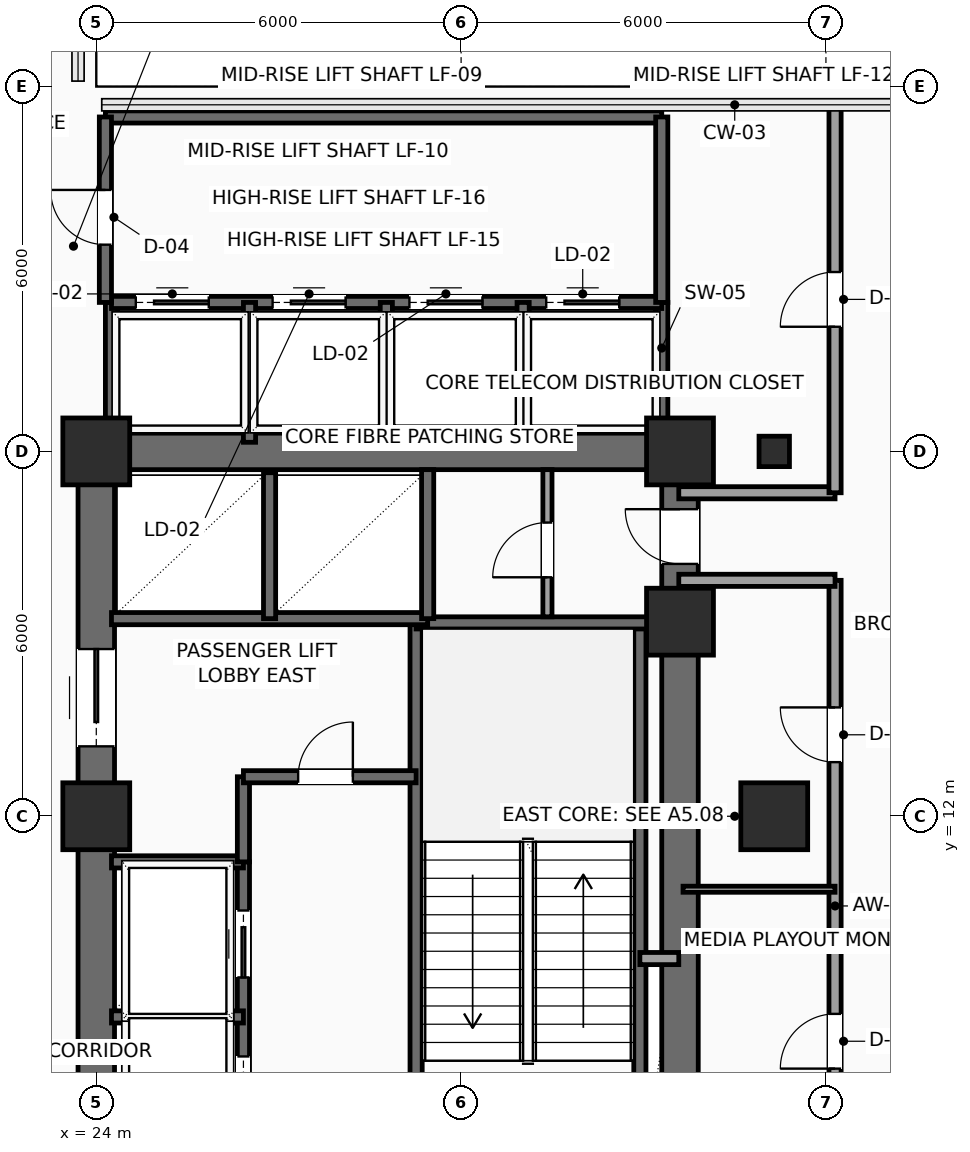
"""IFC4 building model, lengths in metres.
Left out: names, types, materials, properties, quantities, classifications, styles, units other than length and angle.
Written with IfcOpenShell. Run it as: python <this file> out.ifc"""

import sys

from ifc_helpers import new_model, si_unit, direction, frame, frame_2d, origin, origin_2d, place, context, subcontext, project, spatial, rectangle, hollow_rectangle, extrude, element, fill, save


model = new_model("IFC4")
c1 = context("Model", 3, precision=1e-05, world=origin(), true_north=direction((0.0, 1.0)))
c2 = subcontext(c1, "Body", "Model", "MODEL_VIEW")
j1 = project(units=[si_unit("LENGTHUNIT", "METRE"), si_unit("PLANEANGLEUNIT", "RADIAN")], contexts=[c1])
p1 = place(None, origin())
s1 = spatial("IfcSite", under=j1, at=p1, CompositionType="ELEMENT")
p2 = place(p1, origin())
s2 = spatial("IfcBuilding", under=s1, at=p2, CompositionType="ELEMENT")
p3 = place(p2, frame((0.0, 0.0, 138.15)))
s3 = spatial("IfcBuildingStorey", under=s2, at=p3, CompositionType="ELEMENT", Elevation=138.15)
for number, where, z_axis, x_axis in (
    (1, (24.0, 12.0, 0.0), (0.0, 0.0, 1.0), (1.0, 0.0, 0.0)),
    (2, (24.0, 18.0, 0.0), (0.0, 0.0, 1.0), (1.0, 0.0, 0.0)),
    (3, (33.6, 15.2, 0.0), (0.0, 0.0, 1.0), (1.0, 0.0, 0.0)),
    (4, (33.6, 18.0, 0.0), (0.0, 0.0, 1.0), (1.0, 0.0, 0.0)),
    (5, (35.15, 12.0, 0.0), (0.0, 0.0, 1.0), (1.0, 0.0, 0.0)),
):
    element("IfcColumn", number, at=place(p3, frame(where, z_axis=z_axis, x_axis=x_axis)), inside=s3, PredefinedType="COLUMN", context=c2, shape_type="SweptSolid", body=[
        extrude(rectangle(XDim=1.1, YDim=1.1, at=origin_2d()), origin(), (0.0, 0.0, 1.0), 3.75),
    ])
p4 = place(p3, frame((35.15, 18.0, 0.0), z_axis=(0.0, 0.0, 1.0), x_axis=(1.0, 0.0, 0.0)))
e6 = element("IfcColumn", 6, at=p4, inside=s3, PredefinedType="COLUMN", context=c2, shape_type="SweptSolid", body=[
    extrude(hollow_rectangle(XDim=0.5, YDim=0.5, WallThickness=0.025, InnerFilletRadius=0.025, OuterFilletRadius=0.04, at=origin_2d()), origin(), (0.0, 0.0, 1.0), 3.75),
])
p5 = place(p3, frame((24.0, 18.0, 0.0), z_axis=(0.0, 0.0, 1.0), x_axis=(1.0, 0.0, 0.0)))
e7 = element("IfcWall", 7, at=p5, inside=s3, PredefinedType="SHEAR", context=c2, shape_type="SweptSolid", body=[
    extrude(rectangle(XDim=9.6, YDim=0.6, at=frame_2d((4.8, 0.0))), origin(), (0.0, 0.0, 1.0), 3.525),
])
p6 = place(p3, frame((24.0, 6.0, 0.0), z_axis=(0.0, 0.0, 1.0), x_axis=(0.0, 1.0, 0.0)))
e8 = element("IfcWall", 8, at=p6, inside=s3, PredefinedType="SHEAR", context=c2, shape_type="SweptSolid", body=[
    extrude(rectangle(XDim=12.0, YDim=0.6, at=frame_2d((6.0, 0.0))), origin(), (0.0, 0.0, 1.0), 3.525),
])
p7 = place(p6, frame((7.15, 0.0, 0.0)))
e9 = element("IfcOpeningElement", 9, at=p7, cuts=e8, PredefinedType="OPENING", context=c2, shape_type="SweptSolid", body=[
    extrude(rectangle(XDim=1.6, YDim=2.3, at=frame_2d((0.8, 1.15))), frame((0.0, 0.31, 0.0), z_axis=(0.0, -1.0, 0.0), x_axis=(1.0, 0.0, 0.0)), (0.0, 0.0, 1.0), 0.62),
])
p8 = place(p3, frame((33.6, 6.0, 0.0), z_axis=(0.0, 0.0, 1.0), x_axis=(0.0, 1.0, 0.0)))
e10 = element("IfcWall", 10, at=p8, inside=s3, PredefinedType="SHEAR", context=c2, shape_type="SweptSolid", body=[
    extrude(rectangle(XDim=12.0, YDim=0.6, at=frame_2d((6.0, 0.0))), origin(), (0.0, 0.0, 1.0), 3.525),
])
p9 = place(p8, frame((10.15, 0.0, 0.0)))
e11 = element("IfcOpeningElement", 11, at=p9, cuts=e10, PredefinedType="OPENING", context=c2, shape_type="SweptSolid", body=[
    extrude(rectangle(XDim=0.9, YDim=2.15, at=frame_2d((0.45, 1.075))), frame((0.0, 0.31, 0.0), z_axis=(0.0, -1.0, 0.0), x_axis=(1.0, 0.0, 0.0)), (0.0, 0.0, 1.0), 0.62),
])
p10 = place(p3, frame((29.26, 6.3, 0.0), z_axis=(0.0, 0.0, 1.0), x_axis=(0.0, 1.0, 0.0)))
e12 = element("IfcWall", 12, at=p10, inside=s3, PredefinedType="SHEAR", context=c2, shape_type="SweptSolid", body=[
    extrude(rectangle(XDim=8.88, YDim=0.2, at=frame_2d((4.44, 0.0))), origin(), (0.0, 0.0, 1.0), 3.525),
])
p11 = place(p10, frame((0.35, 0.0, 0.0)))
e13 = element("IfcOpeningElement", 13, at=p11, cuts=e12, PredefinedType="OPENING", context=c2, shape_type="SweptSolid", body=[
    extrude(rectangle(XDim=1.1, YDim=2.2, at=frame_2d((0.55, 1.1))), frame((0.0, 0.11, 0.0), z_axis=(0.0, -1.0, 0.0), x_axis=(1.0, 0.0, 0.0)), (0.0, 0.0, 1.0), 0.22),
])
p12 = place(p3, frame((32.94, 6.3, 0.0), z_axis=(0.0, 0.0, 1.0), x_axis=(0.0, 1.0, 0.0)))
e14 = element("IfcWall", 14, at=p12, inside=s3, PredefinedType="SHEAR", context=c2, shape_type="SweptSolid", body=[
    extrude(rectangle(XDim=8.88, YDim=0.2, at=frame_2d((4.44, 0.0))), origin(), (0.0, 0.0, 1.0), 3.525),
])
p13 = place(p3, frame((29.26, 15.18, 0.0), z_axis=(0.0, 0.0, 1.0), x_axis=(1.0, 0.0, 0.0)))
e15 = element("IfcWall", 15, at=p13, inside=s3, PredefinedType="SHEAR", context=c2, shape_type="SweptSolid", body=[
    extrude(rectangle(XDim=4.04, YDim=0.2, at=frame_2d((2.02, 0.0))), origin(), (0.0, 0.0, 1.0), 3.525),
])
p14 = place(p3, frame((26.42, 6.3, 0.0), z_axis=(0.0, 0.0, 1.0), x_axis=(0.0, 1.0, 0.0)))
e16 = element("IfcWall", 16, at=p14, inside=s3, PredefinedType="SHEAR", context=c2, shape_type="SweptSolid", body=[
    extrude(rectangle(XDim=4.95, YDim=0.2, at=frame_2d((2.475, 0.0))), origin(), (0.0, 0.0, 1.0), 3.525),
])
p15 = place(p14, frame((0.65, 0.0, 0.0)))
e17 = element("IfcOpeningElement", 17, at=p15, cuts=e16, PredefinedType="OPENING", context=c2, shape_type="SweptSolid", body=[
    extrude(rectangle(XDim=1.1, YDim=2.2, at=frame_2d((0.55, 1.1))), frame((0.0, 0.11, 0.0), z_axis=(0.0, -1.0, 0.0), x_axis=(1.0, 0.0, 0.0)), (0.0, 0.0, 1.0), 0.22),
])
p16 = place(p14, frame((3.05, 0.0, 0.0)))
e18 = element("IfcOpeningElement", 18, at=p16, cuts=e16, PredefinedType="OPENING", context=c2, shape_type="SweptSolid", body=[
    extrude(rectangle(XDim=1.1, YDim=2.2, at=frame_2d((0.55, 1.1))), frame((0.0, 0.11, 0.0), z_axis=(0.0, -1.0, 0.0), x_axis=(1.0, 0.0, 0.0)), (0.0, 0.0, 1.0), 0.22),
])
for number, where, z_axis, x_axis in (
    (19, (24.25, 8.7, 0.0), (0.0, 0.0, 1.0), (1.0, 0.0, 0.0)),
    (20, (24.25, 11.25, 0.0), (0.0, 0.0, 1.0), (1.0, 0.0, 0.0)),
):
    element("IfcWall", number, at=place(p3, frame(where, z_axis=z_axis, x_axis=x_axis)), inside=s3, PredefinedType="SHEAR", context=c2, shape_type="SweptSolid", body=[
        extrude(rectangle(XDim=2.17, YDim=0.2, at=frame_2d((1.085, 0.0))), origin(), (0.0, 0.0, 1.0), 3.525),
    ])
p17 = place(p3, frame((26.42, 11.25, 0.0), z_axis=(0.0, 0.0, 1.0), x_axis=(0.0, 1.0, 0.0)))
e21 = element("IfcWall", 21, at=p17, inside=s3, PredefinedType="SHEAR", context=c2, shape_type="SweptSolid", body=[
    extrude(rectangle(XDim=1.4, YDim=0.2, at=frame_2d((0.7, 0.0))), origin(), (0.0, 0.0, 1.0), 3.525),
])
p18 = place(p3, frame((26.42, 12.65, 0.0), z_axis=(0.0, 0.0, 1.0), x_axis=(1.0, 0.0, 0.0)))
e22 = element("IfcWall", 22, at=p18, inside=s3, PredefinedType="SHEAR", context=c2, shape_type="SweptSolid", body=[
    extrude(rectangle(XDim=2.84, YDim=0.2, at=frame_2d((1.42, 0.0))), origin(), (0.0, 0.0, 1.0), 3.525),
])
p19 = place(p18, frame((0.9, 0.0, 0.0)))
e23 = element("IfcOpeningElement", 23, at=p19, cuts=e22, PredefinedType="OPENING", context=c2, shape_type="SweptSolid", body=[
    extrude(rectangle(XDim=0.9, YDim=2.15, at=frame_2d((0.45, 1.075))), frame((0.0, 0.11, 0.0), z_axis=(0.0, -1.0, 0.0), x_axis=(1.0, 0.0, 0.0)), (0.0, 0.0, 1.0), 0.22),
])
p20 = place(p3, frame((32.94, 9.66, 0.0), z_axis=(0.0, 0.0, 1.0), x_axis=(1.0, 0.0, 0.0)))
e24 = element("IfcWall", 24, at=p20, inside=s3, PredefinedType="SOLIDWALL", context=c2, shape_type="SweptSolid", body=[
    extrude(rectangle(XDim=0.64, YDim=0.2, at=frame_2d((0.32, 0.0))), origin(), (0.0, 0.0, 1.0), 3.525),
])
p21 = place(p3, frame((24.25, 15.25, 0.0), z_axis=(0.0, 0.0, 1.0), x_axis=(1.0, 0.0, 0.0)))
e25 = element("IfcWall", 25, at=p21, inside=s3, PredefinedType="SHEAR", context=c2, shape_type="SweptSolid", body=[
    extrude(rectangle(XDim=5.2, YDim=0.2, at=frame_2d((2.6, 0.0))), origin(), (0.0, 0.0, 1.0), 3.525),
])
p22 = place(p3, frame((26.85, 15.25, 0.0), z_axis=(0.0, 0.0, 1.0), x_axis=(0.0, 1.0, 0.0)))
e26 = element("IfcWall", 26, at=p22, inside=s3, PredefinedType="SHEAR", context=c2, shape_type="SweptSolid", body=[
    extrude(rectangle(XDim=2.4, YDim=0.2, at=frame_2d((1.2, 0.0))), origin(), (0.0, 0.0, 1.0), 3.525),
])
p23 = place(p3, frame((29.45, 15.25, 0.0), z_axis=(0.0, 0.0, 1.0), x_axis=(0.0, 1.0, 0.0)))
e27 = element("IfcWall", 27, at=p23, inside=s3, PredefinedType="SHEAR", context=c2, shape_type="SweptSolid", body=[
    extrude(rectangle(XDim=2.45, YDim=0.2, at=frame_2d((1.225, 0.0))), origin(), (0.0, 0.0, 1.0), 3.525),
])
p24 = place(p3, frame((31.42, 15.28, 0.0), z_axis=(0.0, 0.0, 1.0), x_axis=(0.0, 1.0, 0.0)))
e28 = element("IfcWall", 28, at=p24, inside=s3, PredefinedType="PARTITIONING", context=c2, shape_type="SweptSolid", body=[
    extrude(rectangle(XDim=2.42, YDim=0.15, at=frame_2d((1.21, 0.0))), origin(), (0.0, 0.0, 1.0), 3.525),
])
p25 = place(p24, frame((0.65, 0.0, 0.0)))
e29 = element("IfcOpeningElement", 29, at=p25, cuts=e28, PredefinedType="OPENING", context=c2, shape_type="SweptSolid", body=[
    extrude(rectangle(XDim=0.9, YDim=2.15, at=frame_2d((0.45, 1.075))), frame((0.0, 0.085, 0.0), z_axis=(0.0, -1.0, 0.0), x_axis=(1.0, 0.0, 0.0)), (0.0, 0.0, 1.0), 0.17),
])
for number, where, z_axis, x_axis in (
    (30, (33.3, 18.1, 0.0), (0.0, 0.0, 1.0), (0.0, 1.0, 0.0)),
    (31, (24.25, 18.1, 0.0), (0.0, 0.0, 1.0), (0.0, 1.0, 0.0)),
):
    element("IfcWall", number, at=place(p3, frame(where, z_axis=z_axis, x_axis=x_axis)), inside=s3, PredefinedType="SHEAR", context=c2, shape_type="SweptSolid", body=[
        extrude(rectangle(XDim=2.35, YDim=0.2, at=frame_2d((1.175, 0.0))), origin(), (0.0, 0.0, 1.0), 3.525),
    ])
p26 = place(p3, frame((24.25, 20.45, 0.0), z_axis=(0.0, 0.0, 1.0), x_axis=(1.0, 0.0, 0.0)))
e32 = element("IfcWall", 32, at=p26, inside=s3, PredefinedType="SHEAR", context=c2, shape_type="SweptSolid", body=[
    extrude(rectangle(XDim=9.05, YDim=0.2, at=frame_2d((4.525, 0.0))), origin(), (0.0, 0.0, 1.0), 3.525),
])
p27 = place(p26, frame((0.4, 0.0, 0.0)))
e33 = element("IfcOpeningElement", 33, at=p27, cuts=e32, PredefinedType="OPENING", context=c2, shape_type="SweptSolid", body=[
    extrude(rectangle(XDim=1.2, YDim=2.2, at=frame_2d((0.6, 1.1))), frame((0.0, 0.11, 0.0), z_axis=(0.0, -1.0, 0.0), x_axis=(1.0, 0.0, 0.0)), (0.0, 0.0, 1.0), 0.22),
])
p28 = place(p26, frame((2.65, 0.0, 0.0)))
e34 = element("IfcOpeningElement", 34, at=p28, cuts=e32, PredefinedType="OPENING", context=c2, shape_type="SweptSolid", body=[
    extrude(rectangle(XDim=1.2, YDim=2.2, at=frame_2d((0.6, 1.1))), frame((0.0, 0.11, 0.0), z_axis=(0.0, -1.0, 0.0), x_axis=(1.0, 0.0, 0.0)), (0.0, 0.0, 1.0), 0.22),
])
p29 = place(p26, frame((4.9, 0.0, 0.0)))
e35 = element("IfcOpeningElement", 35, at=p29, cuts=e32, PredefinedType="OPENING", context=c2, shape_type="SweptSolid", body=[
    extrude(rectangle(XDim=1.2, YDim=2.2, at=frame_2d((0.6, 1.1))), frame((0.0, 0.11, 0.0), z_axis=(0.0, -1.0, 0.0), x_axis=(1.0, 0.0, 0.0)), (0.0, 0.0, 1.0), 0.22),
])
p30 = place(p26, frame((7.15, 0.0, 0.0)))
e36 = element("IfcOpeningElement", 36, at=p30, cuts=e32, PredefinedType="OPENING", context=c2, shape_type="SweptSolid", body=[
    extrude(rectangle(XDim=1.2, YDim=2.2, at=frame_2d((0.6, 1.1))), frame((0.0, 0.11, 0.0), z_axis=(0.0, -1.0, 0.0), x_axis=(1.0, 0.0, 0.0)), (0.0, 0.0, 1.0), 0.22),
])
for number, where, z_axis, x_axis in (
    (37, (26.52, 18.15, 0.0), (0.0, 0.0, 1.0), (0.0, 1.0, 0.0)),
    (38, (28.77, 18.15, 0.0), (0.0, 0.0, 1.0), (0.0, 1.0, 0.0)),
    (39, (31.02, 18.15, 0.0), (0.0, 0.0, 1.0), (0.0, 1.0, 0.0)),
):
    element("IfcWall", number, at=place(p3, frame(where, z_axis=z_axis, x_axis=x_axis)), inside=s3, PredefinedType="SHEAR", context=c2, shape_type="SweptSolid", body=[
        extrude(rectangle(XDim=2.3, YDim=0.2, at=frame_2d((1.15, 0.0))), origin(), (0.0, 0.0, 1.0), 3.525),
    ])
p31 = place(p3, frame((24.15, 23.5, 0.0), z_axis=(0.0, 0.0, 1.0), x_axis=(1.0, 0.0, 0.0)))
e40 = element("IfcWall", 40, at=p31, inside=s3, PredefinedType="SHEAR", context=c2, shape_type="SweptSolid", body=[
    extrude(rectangle(XDim=9.15, YDim=0.2, at=frame_2d((4.575, 0.0))), origin(), (0.0, 0.0, 1.0), 3.525),
])
p32 = place(p3, frame((33.3, 20.45, 0.0), z_axis=(0.0, 0.0, 1.0), x_axis=(0.0, 1.0, 0.0)))
e41 = element("IfcWall", 41, at=p32, inside=s3, PredefinedType="SHEAR", context=c2, shape_type="SweptSolid", body=[
    extrude(rectangle(XDim=3.05, YDim=0.2, at=frame_2d((1.525, 0.0))), origin(), (0.0, 0.0, 1.0), 3.525),
])
p33 = place(p3, frame((24.15, 20.45, 0.0), z_axis=(0.0, 0.0, 1.0), x_axis=(0.0, 1.0, 0.0)))
e42 = element("IfcWall", 42, at=p33, inside=s3, PredefinedType="SHEAR", context=c2, shape_type="SweptSolid", body=[
    extrude(rectangle(XDim=3.05, YDim=0.2, at=frame_2d((1.525, 0.0))), origin(), (0.0, 0.0, 1.0), 3.525),
])
p34 = place(p33, frame((0.95, 0.0, 0.0)))
e43 = element("IfcOpeningElement", 43, at=p34, cuts=e42, PredefinedType="OPENING", context=c2, shape_type="SweptSolid", body=[
    extrude(rectangle(XDim=0.9, YDim=2.15, at=frame_2d((0.45, 1.075))), frame((0.0, 0.11, 0.0), z_axis=(0.0, -1.0, 0.0), x_axis=(1.0, 0.0, 0.0)), (0.0, 0.0, 1.0), 0.22),
])
p35 = place(p3, frame((36.15, 5.8, 0.0), z_axis=(0.0, 0.0, 1.0), x_axis=(0.0, 1.0, 0.0)))
e44 = element("IfcWall", 44, at=p35, inside=s3, PredefinedType="PARTITIONING", context=c2, shape_type="SweptSolid", body=[
    extrude(rectangle(XDim=10.08, YDim=0.2, at=frame_2d((5.04, 0.0))), origin(), (0.0, 0.0, 1.0), 3.525),
])
p36 = place(p35, frame((2.05, 0.0, 0.0)))
e45 = element("IfcOpeningElement", 45, at=p36, cuts=e44, PredefinedType="OPENING", context=c2, shape_type="SweptSolid", body=[
    extrude(rectangle(XDim=0.9, YDim=2.1, at=frame_2d((0.45, 1.05))), frame((0.0, 0.11, 0.0), z_axis=(0.0, -1.0, 0.0), x_axis=(1.0, 0.0, 0.0)), (0.0, 0.0, 1.0), 0.22),
])
p37 = place(p35, frame((7.09, 0.0, 0.0)))
e46 = element("IfcOpeningElement", 46, at=p37, cuts=e44, PredefinedType="OPENING", context=c2, shape_type="SweptSolid", body=[
    extrude(rectangle(XDim=0.9, YDim=2.1, at=frame_2d((0.45, 1.05))), frame((0.0, 0.11, 0.0), z_axis=(0.0, -1.0, 0.0), x_axis=(1.0, 0.0, 0.0)), (0.0, 0.0, 1.0), 0.22),
])
for number, where, z_axis, x_axis in (
    (47, (36.15, 15.88, 0.0), (0.0, 0.0, 1.0), (-1.0, 0.0, 0.0)),
    (48, (33.58, 17.32, 0.0), (0.0, 0.0, 1.0), (1.0, 0.0, 0.0)),
):
    element("IfcWall", number, at=place(p3, frame(where, z_axis=z_axis, x_axis=x_axis)), inside=s3, PredefinedType="PARTITIONING", context=c2, shape_type="SweptSolid", body=[
        extrude(rectangle(XDim=2.57, YDim=0.2, at=frame_2d((1.285, 0.0))), origin(), (0.0, 0.0, 1.0), 3.525),
    ])
p38 = place(p3, frame((36.15, 17.32, 0.0), z_axis=(0.0, 0.0, 1.0), x_axis=(0.0, 1.0, 0.0)))
e49 = element("IfcWall", 49, at=p38, inside=s3, PredefinedType="PARTITIONING", context=c2, shape_type="SweptSolid", body=[
    extrude(rectangle(XDim=6.38, YDim=0.2, at=frame_2d((3.19, 0.0))), origin(), (0.0, 0.0, 1.0), 3.525),
])
p39 = place(p38, frame((2.73, 0.0, 0.0)))
e50 = element("IfcOpeningElement", 50, at=p39, cuts=e49, PredefinedType="OPENING", context=c2, shape_type="SweptSolid", body=[
    extrude(rectangle(XDim=0.9, YDim=2.1, at=frame_2d((0.45, 1.05))), frame((0.0, 0.11, 0.0), z_axis=(0.0, -1.0, 0.0), x_axis=(1.0, 0.0, 0.0)), (0.0, 0.0, 1.0), 0.22),
])
p40 = place(p3, frame((33.65, 10.8, 0.0), z_axis=(0.0, 0.0, 1.0), x_axis=(1.0, 0.0, 0.0)))
e51 = element("IfcWall", 51, at=p40, inside=s3, PredefinedType="PARTITIONING", context=c2, shape_type="SweptSolid", body=[
    extrude(rectangle(XDim=2.5, YDim=0.1, at=frame_2d((1.25, 0.0))), origin(), (0.0, 0.0, 1.0), 3.525),
])
p41 = place(p7, origin())
e52 = element("IfcDoor", 52, at=p41, inside=s3, OperationType="DOUBLE_DOOR_SLIDING", PredefinedType="DOOR", context=c2, shape_type="SweptSolid", body=[
    extrude(rectangle(XDim=1.6, YDim=2.3, at=frame_2d((0.8, 1.15))), frame((0.0, 0.025, 0.0), z_axis=(0.0, -1.0, 0.0), x_axis=(1.0, 0.0, 0.0)), (0.0, 0.0, 1.0), 0.05),
])
fill(e9, e52)
p42 = place(p9, origin())
e53 = element("IfcDoor", 53, at=p42, inside=s3, OperationType="SINGLE_SWING_RIGHT", PredefinedType="DOOR", context=c2, shape_type="SweptSolid", body=[
    extrude(rectangle(XDim=0.9, YDim=2.15, at=frame_2d((0.45, 1.075))), frame((0.0, 0.025, 0.0), z_axis=(0.0, -1.0, 0.0), x_axis=(1.0, 0.0, 0.0)), (0.0, 0.0, 1.0), 0.05),
])
fill(e11, e53)
p43 = place(p15, origin())
e54 = element("IfcDoor", 54, at=p43, inside=s3, OperationType="SLIDING_TO_LEFT", PredefinedType="DOOR", context=c2, shape_type="SweptSolid", body=[
    extrude(rectangle(XDim=1.1, YDim=2.2, at=frame_2d((0.55, 1.1))), frame((0.0, 0.025, 0.0), z_axis=(0.0, -1.0, 0.0), x_axis=(1.0, 0.0, 0.0)), (0.0, 0.0, 1.0), 0.05),
])
fill(e17, e54)
p44 = place(p16, origin())
e55 = element("IfcDoor", 55, at=p44, inside=s3, OperationType="SLIDING_TO_LEFT", PredefinedType="DOOR", context=c2, shape_type="SweptSolid", body=[
    extrude(rectangle(XDim=1.1, YDim=2.2, at=frame_2d((0.55, 1.1))), frame((0.0, 0.025, 0.0), z_axis=(0.0, -1.0, 0.0), x_axis=(1.0, 0.0, 0.0)), (0.0, 0.0, 1.0), 0.05),
])
fill(e18, e55)
p45 = place(p19, origin())
e56 = element("IfcDoor", 56, at=p45, inside=s3, OperationType="SINGLE_SWING_RIGHT", PredefinedType="DOOR", context=c2, shape_type="SweptSolid", body=[
    extrude(rectangle(XDim=0.9, YDim=2.15, at=frame_2d((0.45, 1.075))), frame((0.0, 0.025, 0.0), z_axis=(0.0, -1.0, 0.0), x_axis=(1.0, 0.0, 0.0)), (0.0, 0.0, 1.0), 0.05),
])
fill(e23, e56)
p46 = place(p25, origin())
e57 = element("IfcDoor", 57, at=p46, inside=s3, OperationType="SINGLE_SWING_LEFT", PredefinedType="DOOR", context=c2, shape_type="SweptSolid", body=[
    extrude(rectangle(XDim=0.9, YDim=2.15, at=frame_2d((0.45, 1.075))), frame((0.0, 0.025, 0.0), z_axis=(0.0, -1.0, 0.0), x_axis=(1.0, 0.0, 0.0)), (0.0, 0.0, 1.0), 0.05),
])
fill(e29, e57)
p47 = place(p27, origin())
e58 = element("IfcDoor", 58, at=p47, inside=s3, OperationType="SLIDING_TO_RIGHT", PredefinedType="DOOR", context=c2, shape_type="SweptSolid", body=[
    extrude(rectangle(XDim=1.2, YDim=2.2, at=frame_2d((0.6, 1.1))), frame((0.0, 0.025, 0.0), z_axis=(0.0, -1.0, 0.0), x_axis=(1.0, 0.0, 0.0)), (0.0, 0.0, 1.0), 0.05),
])
fill(e33, e58)
p48 = place(p28, origin())
e59 = element("IfcDoor", 59, at=p48, inside=s3, OperationType="SLIDING_TO_RIGHT", PredefinedType="DOOR", context=c2, shape_type="SweptSolid", body=[
    extrude(rectangle(XDim=1.2, YDim=2.2, at=frame_2d((0.6, 1.1))), frame((0.0, 0.025, 0.0), z_axis=(0.0, -1.0, 0.0), x_axis=(1.0, 0.0, 0.0)), (0.0, 0.0, 1.0), 0.05),
])
fill(e34, e59)
p49 = place(p29, origin())
e60 = element("IfcDoor", 60, at=p49, inside=s3, OperationType="SLIDING_TO_RIGHT", PredefinedType="DOOR", context=c2, shape_type="SweptSolid", body=[
    extrude(rectangle(XDim=1.2, YDim=2.2, at=frame_2d((0.6, 1.1))), frame((0.0, 0.025, 0.0), z_axis=(0.0, -1.0, 0.0), x_axis=(1.0, 0.0, 0.0)), (0.0, 0.0, 1.0), 0.05),
])
fill(e35, e60)
p50 = place(p30, origin())
e61 = element("IfcDoor", 61, at=p50, inside=s3, OperationType="SLIDING_TO_RIGHT", PredefinedType="DOOR", context=c2, shape_type="SweptSolid", body=[
    extrude(rectangle(XDim=1.2, YDim=2.2, at=frame_2d((0.6, 1.1))), frame((0.0, 0.025, 0.0), z_axis=(0.0, -1.0, 0.0), x_axis=(1.0, 0.0, 0.0)), (0.0, 0.0, 1.0), 0.05),
])
fill(e36, e61)
p51 = place(p34, origin())
e62 = element("IfcDoor", 62, at=p51, inside=s3, OperationType="SINGLE_SWING_RIGHT", PredefinedType="DOOR", context=c2, shape_type="SweptSolid", body=[
    extrude(rectangle(XDim=0.9, YDim=2.15, at=frame_2d((0.45, 1.075))), frame((0.0, 0.025, 0.0), z_axis=(0.0, -1.0, 0.0), x_axis=(1.0, 0.0, 0.0)), (0.0, 0.0, 1.0), 0.05),
])
fill(e43, e62)
p52 = place(p36, origin())
e63 = element("IfcDoor", 63, at=p52, inside=s3, OperationType="SINGLE_SWING_LEFT", PredefinedType="DOOR", context=c2, shape_type="SweptSolid", body=[
    extrude(rectangle(XDim=0.9, YDim=2.1, at=frame_2d((0.45, 1.05))), frame((0.0, 0.025, 0.0), z_axis=(0.0, -1.0, 0.0), x_axis=(1.0, 0.0, 0.0)), (0.0, 0.0, 1.0), 0.05),
])
fill(e45, e63)
p53 = place(p37, origin())
e64 = element("IfcDoor", 64, at=p53, inside=s3, OperationType="SINGLE_SWING_RIGHT", PredefinedType="DOOR", context=c2, shape_type="SweptSolid", body=[
    extrude(rectangle(XDim=0.9, YDim=2.1, at=frame_2d((0.45, 1.05))), frame((0.0, 0.025, 0.0), z_axis=(0.0, -1.0, 0.0), x_axis=(1.0, 0.0, 0.0)), (0.0, 0.0, 1.0), 0.05),
])
fill(e46, e64)
p54 = place(p39, origin())
e65 = element("IfcDoor", 65, at=p54, inside=s3, OperationType="SINGLE_SWING_LEFT", PredefinedType="DOOR", context=c2, shape_type="SweptSolid", body=[
    extrude(rectangle(XDim=0.9, YDim=2.1, at=frame_2d((0.45, 1.05))), frame((0.0, 0.025, 0.0), z_axis=(0.0, -1.0, 0.0), x_axis=(1.0, 0.0, 0.0)), (0.0, 0.0, 1.0), 0.05),
])
fill(e50, e65)
save(model, sys.argv[1])
